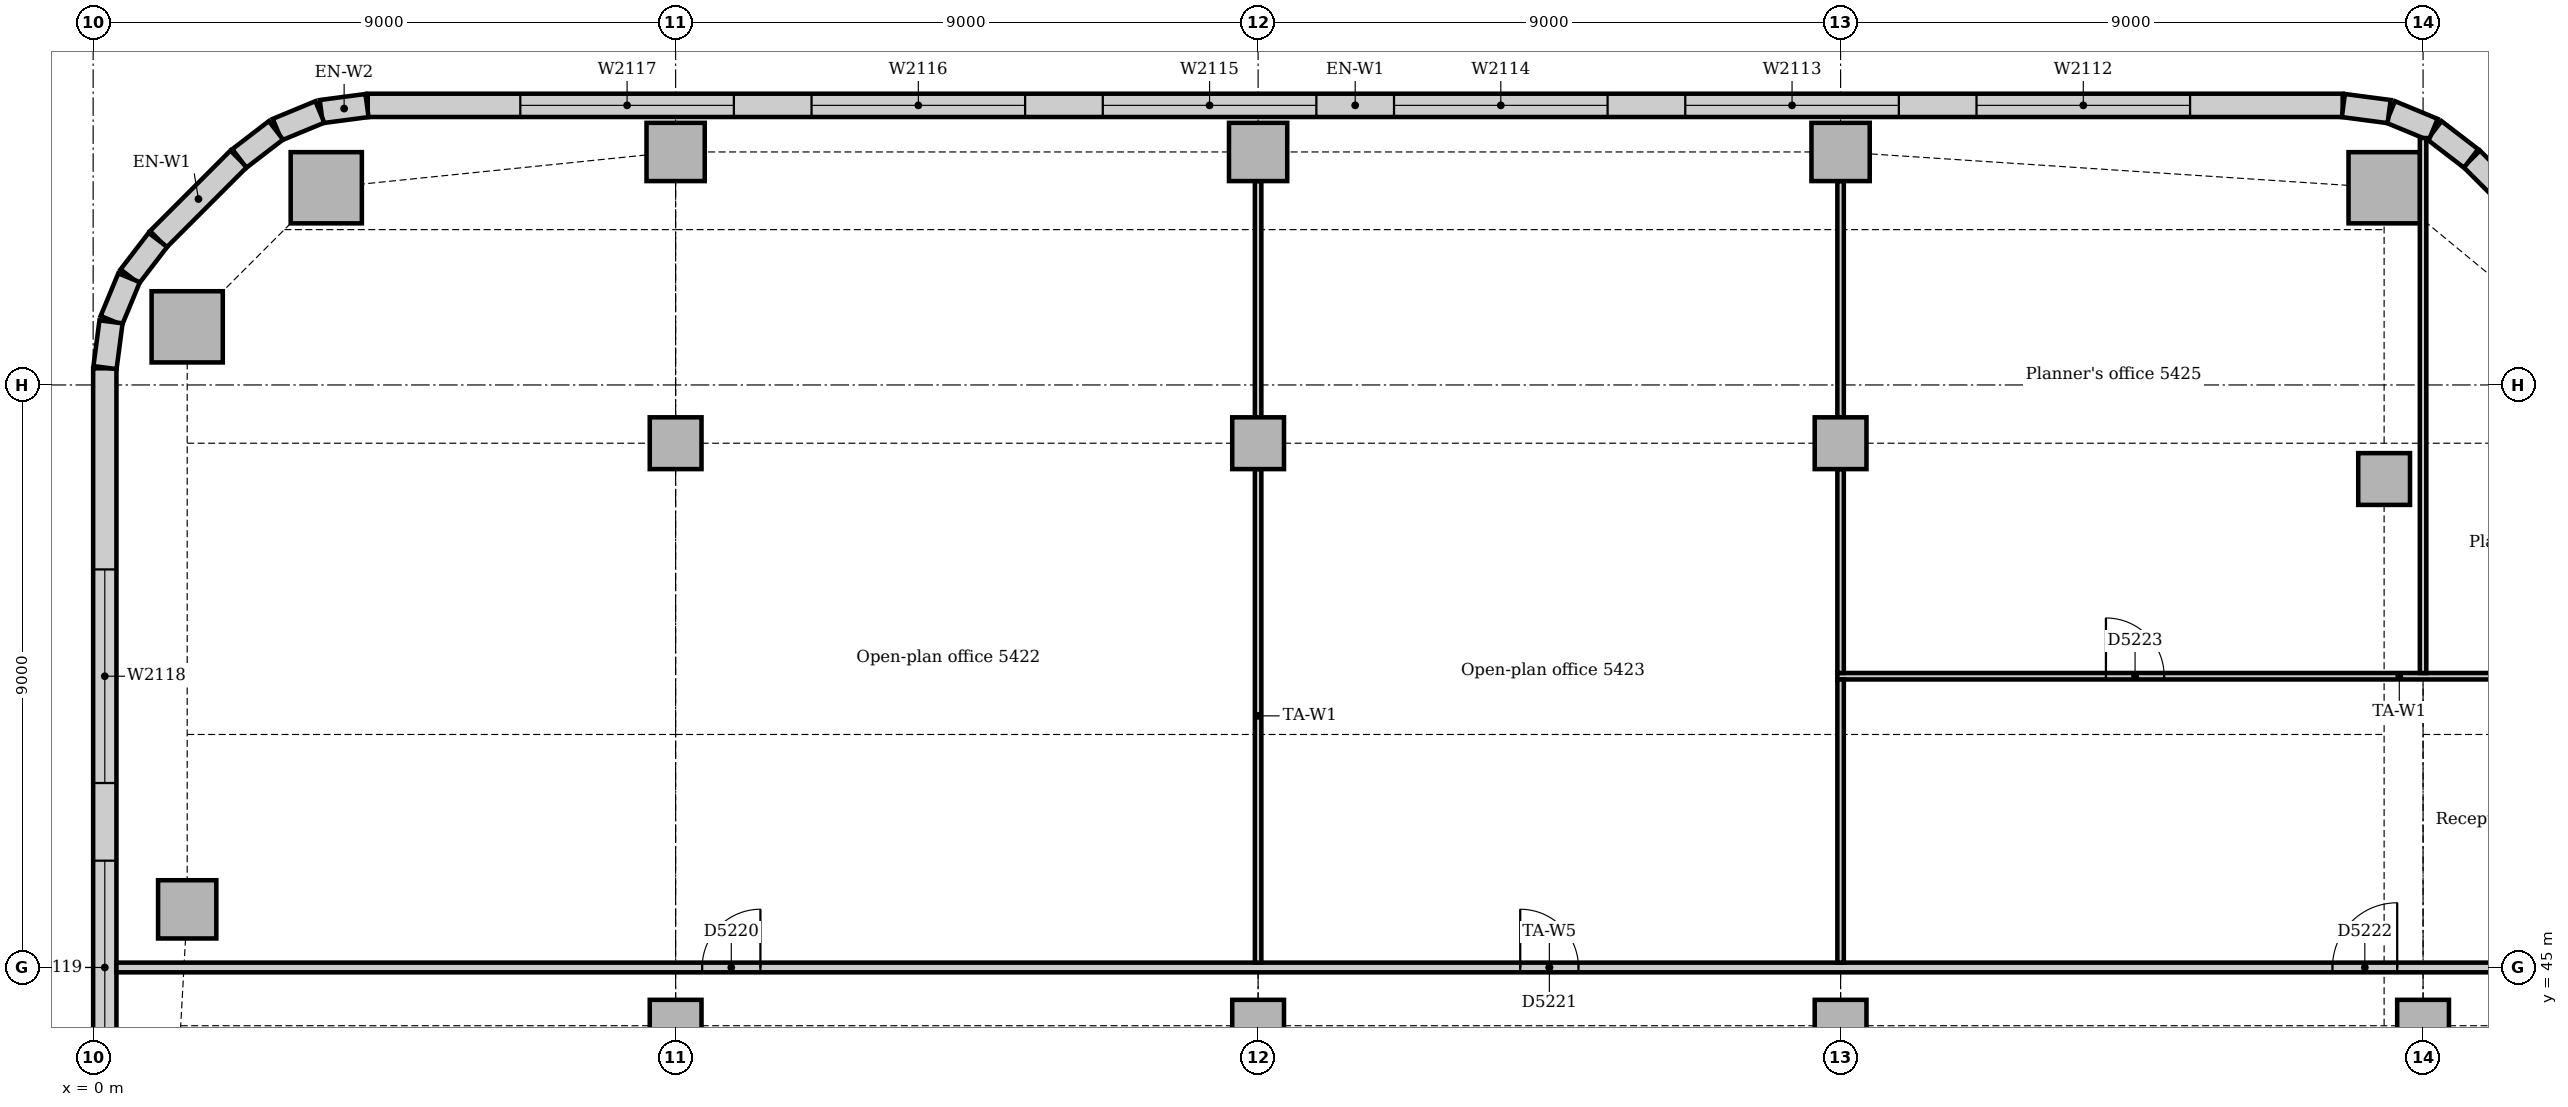
"""IFC4 building model, lengths in metres.
Left out: names, types, materials, properties, quantities, classifications, styles, units other than length and angle.
Written with IfcOpenShell. Run it as: python <this file> out.ifc"""

import sys

from ifc_helpers import new_model, si_unit, direction, frame, frame_2d, origin, origin_2d, place, context, subcontext, project, spatial, rectangle, extrude, element, fill, save


model = new_model("IFC4")
c1 = context("Model", 3, precision=1e-05, world=origin(), true_north=direction((0.0, 1.0)))
c2 = subcontext(c1, "Body", "Model", "MODEL_VIEW")
j1 = project(units=[si_unit("LENGTHUNIT", "METRE"), si_unit("PLANEANGLEUNIT", "RADIAN")], contexts=[c1])
p1 = place(None, origin())
s1 = spatial("IfcSite", under=j1, at=p1, CompositionType="ELEMENT")
p2 = place(p1, origin())
s2 = spatial("IfcBuilding", under=s1, at=p2, CompositionType="ELEMENT")
p3 = place(p2, frame((0.0, 0.0, 226.0)))
s3 = spatial("IfcBuildingStorey", under=s2, at=p3, CompositionType="ELEMENT", Elevation=226.0)
for number, where, z_axis, x_axis in (
    (1, (35.398, 57.047, 0.0), (0.0, 0.0, 1.0), (1.0, 0.0, 0.0)),
    (2, (3.602, 57.047, 0.0), (0.0, 0.0, 1.0), (1.0, 0.0, 0.0)),
    (3, (1.453, 54.898, 0.0), (0.0, 0.0, 1.0), (1.0, 0.0, 0.0)),
):
    element("IfcColumn", number, at=place(p3, frame(where, z_axis=z_axis, x_axis=x_axis)), inside=s3, PredefinedType="COLUMN", context=c2, shape_type="SweptSolid", body=[
        extrude(rectangle(XDim=1.1, YDim=1.1, at=origin_2d()), origin(), (0.0, 0.0, 1.0), 3.85),
    ])
for number, where, z_axis, x_axis in (
    (4, (9.0, 57.6, 0.0), (0.0, 0.0, 1.0), (1.0, 0.0, 0.0)),
    (5, (18.0, 57.6, 0.0), (0.0, 0.0, 1.0), (1.0, 0.0, 0.0)),
    (6, (27.0, 57.6, 0.0), (0.0, 0.0, 1.0), (1.0, 0.0, 0.0)),
    (7, (1.453, 45.898, 0.0), (0.0, 0.0, 1.0), (1.0, 0.0, 0.0)),
):
    element("IfcColumn", number, at=place(p3, frame(where, z_axis=z_axis, x_axis=x_axis)), inside=s3, PredefinedType="COLUMN", context=c2, shape_type="SweptSolid", body=[
        extrude(rectangle(XDim=0.9, YDim=0.9, at=origin_2d()), origin(), (0.0, 0.0, 1.0), 3.85),
    ])
for number, where, z_axis, x_axis in (
    (8, (9.0, 44.1, 0.0), (0.0, 0.0, 1.0), (1.0, 0.0, 0.0)),
    (9, (9.0, 53.1, 0.0), (0.0, 0.0, 1.0), (1.0, 0.0, 0.0)),
    (10, (18.0, 44.1, 0.0), (0.0, 0.0, 1.0), (1.0, 0.0, 0.0)),
    (11, (18.0, 53.1, 0.0), (0.0, 0.0, 1.0), (1.0, 0.0, 0.0)),
    (12, (27.0, 44.1, 0.0), (0.0, 0.0, 1.0), (1.0, 0.0, 0.0)),
    (13, (27.0, 53.1, 0.0), (0.0, 0.0, 1.0), (1.0, 0.0, 0.0)),
    (14, (36.0, 44.1, 0.0), (0.0, 0.0, 1.0), (1.0, 0.0, 0.0)),
    (15, (35.398, 52.547, 0.0), (0.0, 0.0, 1.0), (1.0, 0.0, 0.0)),
):
    element("IfcColumn", number, at=place(p3, frame(where, z_axis=z_axis, x_axis=x_axis)), inside=s3, PredefinedType="COLUMN", context=c2, shape_type="SweptSolid", body=[
        extrude(rectangle(XDim=0.8, YDim=0.8, at=origin_2d()), origin(), (0.0, 0.0, 1.0), 3.85),
    ])
p4 = place(p3, frame((43.994, 50.251, 0.0), z_axis=(0.0, 0.0, 1.0), x_axis=(-0.707106781187, 0.707106781187, 0.0)))
e16 = element("IfcWall", 16, at=p4, inside=s3, PredefinedType="STANDARD", context=c2, shape_type="SweptSolid", body=[
    extrude(rectangle(XDim=10.243, YDim=0.36, at=frame_2d((5.121, 0.0))), origin(), (0.0, 0.0, 1.0), 3.85),
])
p5 = place(p4, frame((3.471, 0.0, 0.9)))
e17 = element("IfcOpeningElement", 17, at=p5, cuts=e16, PredefinedType="OPENING", context=c2, shape_type="SweptSolid", body=[
    extrude(rectangle(XDim=3.3, YDim=1.6, at=frame_2d((1.65, 0.8))), frame((0.0, 0.19, 0.0), z_axis=(0.0, -1.0, 0.0), x_axis=(1.0, 0.0, 0.0)), (0.0, 0.0, 1.0), 0.38),
])
p6 = place(p3, frame((34.757, 58.32, 0.0), z_axis=(0.0, 0.0, 1.0), x_axis=(-1.0, 0.0, 0.0)))
e18 = element("IfcWall", 18, at=p6, inside=s3, PredefinedType="STANDARD", context=c2, shape_type="SweptSolid", body=[
    extrude(rectangle(XDim=30.515, YDim=0.36, at=frame_2d((15.257, 0.0))), origin(), (0.0, 0.0, 1.0), 3.85),
])
p7 = place(p6, frame((2.357, 0.0, 0.9)))
e19 = element("IfcOpeningElement", 19, at=p7, cuts=e18, PredefinedType="OPENING", context=c2, shape_type="SweptSolid", body=[
    extrude(rectangle(XDim=3.3, YDim=1.6, at=frame_2d((1.65, 0.8))), frame((0.0, 0.19, 0.0), z_axis=(0.0, -1.0, 0.0), x_axis=(1.0, 0.0, 0.0)), (0.0, 0.0, 1.0), 0.38),
])
p8 = place(p6, frame((6.857, 0.0, 0.9)))
e20 = element("IfcOpeningElement", 20, at=p8, cuts=e18, PredefinedType="OPENING", context=c2, shape_type="SweptSolid", body=[
    extrude(rectangle(XDim=3.3, YDim=1.6, at=frame_2d((1.65, 0.8))), frame((0.0, 0.19, 0.0), z_axis=(0.0, -1.0, 0.0), x_axis=(1.0, 0.0, 0.0)), (0.0, 0.0, 1.0), 0.38),
])
p9 = place(p6, frame((11.357, 0.0, 0.9)))
e21 = element("IfcOpeningElement", 21, at=p9, cuts=e18, PredefinedType="OPENING", context=c2, shape_type="SweptSolid", body=[
    extrude(rectangle(XDim=3.3, YDim=1.6, at=frame_2d((1.65, 0.8))), frame((0.0, 0.19, 0.0), z_axis=(0.0, -1.0, 0.0), x_axis=(1.0, 0.0, 0.0)), (0.0, 0.0, 1.0), 0.38),
])
p10 = place(p6, frame((15.857, 0.0, 0.9)))
e22 = element("IfcOpeningElement", 22, at=p10, cuts=e18, PredefinedType="OPENING", context=c2, shape_type="SweptSolid", body=[
    extrude(rectangle(XDim=3.3, YDim=1.6, at=frame_2d((1.65, 0.8))), frame((0.0, 0.19, 0.0), z_axis=(0.0, -1.0, 0.0), x_axis=(1.0, 0.0, 0.0)), (0.0, 0.0, 1.0), 0.38),
])
p11 = place(p6, frame((20.357, 0.0, 0.9)))
e23 = element("IfcOpeningElement", 23, at=p11, cuts=e18, PredefinedType="OPENING", context=c2, shape_type="SweptSolid", body=[
    extrude(rectangle(XDim=3.3, YDim=1.6, at=frame_2d((1.65, 0.8))), frame((0.0, 0.19, 0.0), z_axis=(0.0, -1.0, 0.0), x_axis=(1.0, 0.0, 0.0)), (0.0, 0.0, 1.0), 0.38),
])
p12 = place(p6, frame((24.857, 0.0, 0.9)))
e24 = element("IfcOpeningElement", 24, at=p12, cuts=e18, PredefinedType="OPENING", context=c2, shape_type="SweptSolid", body=[
    extrude(rectangle(XDim=3.3, YDim=1.6, at=frame_2d((1.65, 0.8))), frame((0.0, 0.19, 0.0), z_axis=(0.0, -1.0, 0.0), x_axis=(1.0, 0.0, 0.0)), (0.0, 0.0, 1.0), 0.38),
])
p13 = place(p3, frame((2.249, 57.494, 0.0), z_axis=(0.0, 0.0, 1.0), x_axis=(-0.707106781187, -0.707106781187, 0.0)))
e25 = element("IfcWall", 25, at=p13, inside=s3, PredefinedType="STANDARD", context=c2, shape_type="SweptSolid", body=[
    extrude(rectangle(XDim=1.757, YDim=0.36, at=frame_2d((0.879, 0.0))), origin(), (0.0, 0.0, 1.0), 3.85),
])
p14 = place(p3, frame((0.18, 54.257, 0.0), z_axis=(0.0, 0.0, 1.0), x_axis=(0.0, -1.0, 0.0)))
e26 = element("IfcWall", 26, at=p14, inside=s3, PredefinedType="STANDARD", context=c2, shape_type="SweptSolid", body=[
    extrude(rectangle(XDim=12.257, YDim=0.36, at=frame_2d((6.129, 0.0))), origin(), (0.0, 0.0, 1.0), 3.85),
])
p15 = place(p14, frame((3.107, 0.0, 0.9)))
e27 = element("IfcOpeningElement", 27, at=p15, cuts=e26, PredefinedType="OPENING", context=c2, shape_type="SweptSolid", body=[
    extrude(rectangle(XDim=3.3, YDim=1.6, at=frame_2d((1.65, 0.8))), frame((0.0, 0.19, 0.0), z_axis=(0.0, -1.0, 0.0), x_axis=(1.0, 0.0, 0.0)), (0.0, 0.0, 1.0), 0.38),
])
p16 = place(p14, frame((7.607, 0.0, 0.9)))
e28 = element("IfcOpeningElement", 28, at=p16, cuts=e26, PredefinedType="OPENING", context=c2, shape_type="SweptSolid", body=[
    extrude(rectangle(XDim=3.3, YDim=1.6, at=frame_2d((1.65, 0.8))), frame((0.0, 0.19, 0.0), z_axis=(0.0, -1.0, 0.0), x_axis=(1.0, 0.0, 0.0)), (0.0, 0.0, 1.0), 0.38),
])
p17 = place(p3, frame((36.741, 57.5, 0.0), z_axis=(0.0, 0.0, 1.0), x_axis=(-0.793321924995, 0.608802368033, 0.0)))
e29 = element("IfcWall", 29, at=p17, inside=s3, PredefinedType="STANDARD", context=c2, shape_type="SweptSolid", body=[
    extrude(rectangle(XDim=0.713, YDim=0.36, at=frame_2d((0.357, 0.0))), origin(), (0.0, 0.0, 1.0), 3.85),
])
for number, where, z_axis, x_axis in (
    (30, (36.156, 57.945, 0.0), (0.0, 0.0, 1.0), (-0.924, 0.383, 0.0)),
    (31, (35.476, 58.224, 0.0), (0.0, 0.0, 1.0), (-0.991, 0.131, 0.0)),
    (32, (4.231, 58.317, 0.0), (0.0, 0.0, 1.0), (-0.991, -0.131, 0.0)),
    (33, (3.503, 58.218, 0.0), (0.0, 0.0, 1.0), (-0.924, -0.383, 0.0)),
):
    element("IfcWall", number, at=place(p3, frame(where, z_axis=z_axis, x_axis=x_axis)), inside=s3, PredefinedType="STANDARD", context=c2, shape_type="SweptSolid", body=[
        extrude(rectangle(XDim=0.713, YDim=0.36, at=frame_2d((0.356, 0.0))), origin(), (0.0, 0.0, 1.0), 3.85),
    ])
for number, where, z_axis, x_axis in (
    (34, (2.825, 57.934, 0.0), (0.0, 0.0, 1.0), (-0.793, -0.609, 0.0)),
    (35, (1.0, 56.241, 0.0), (0.0, 0.0, 1.0), (-0.609, -0.793, 0.0)),
):
    element("IfcWall", number, at=place(p3, frame(where, z_axis=z_axis, x_axis=x_axis)), inside=s3, PredefinedType="STANDARD", context=c2, shape_type="SweptSolid", body=[
        extrude(rectangle(XDim=0.713, YDim=0.36, at=frame_2d((0.357, 0.0))), origin(), (0.0, 0.0, 1.0), 3.85),
    ])
for number, where, z_axis, x_axis in (
    (36, (0.555, 55.656, 0.0), (0.0, 0.0, 1.0), (-0.383, -0.924, 0.0)),
    (37, (0.276, 54.976, 0.0), (0.0, 0.0, 1.0), (-0.131, -0.991, 0.0)),
):
    element("IfcWall", number, at=place(p3, frame(where, z_axis=z_axis, x_axis=x_axis)), inside=s3, PredefinedType="STANDARD", context=c2, shape_type="SweptSolid", body=[
        extrude(rectangle(XDim=0.713, YDim=0.36, at=frame_2d((0.356, 0.0))), origin(), (0.0, 0.0, 1.0), 3.85),
    ])
p18 = place(p3, frame((0.36, 45.0, 0.0), z_axis=(0.0, 0.0, 1.0), x_axis=(1.0, 0.0, 0.0)))
e38 = element("IfcWall", 38, at=p18, inside=s3, PredefinedType="PARTITIONING", context=c2, shape_type="SweptSolid", body=[
    extrude(rectangle(XDim=44.28, YDim=0.15, at=frame_2d((22.14, 0.0))), origin(), (0.0, 0.0, 1.0), 3.85),
])
p19 = place(p18, frame((9.05, 0.0, 0.0)))
e39 = element("IfcOpeningElement", 39, at=p19, cuts=e38, PredefinedType="OPENING", context=c2, shape_type="SweptSolid", body=[
    extrude(rectangle(XDim=0.9, YDim=2.1, at=frame_2d((0.45, 1.05))), frame((0.0, 0.085, 0.0), z_axis=(0.0, -1.0, 0.0), x_axis=(1.0, 0.0, 0.0)), (0.0, 0.0, 1.0), 0.17),
])
p20 = place(p18, frame((21.69, 0.0, 0.0)))
e40 = element("IfcOpeningElement", 40, at=p20, cuts=e38, PredefinedType="OPENING", context=c2, shape_type="SweptSolid", body=[
    extrude(rectangle(XDim=0.9, YDim=2.1, at=frame_2d((0.45, 1.05))), frame((0.0, 0.085, 0.0), z_axis=(0.0, -1.0, 0.0), x_axis=(1.0, 0.0, 0.0)), (0.0, 0.0, 1.0), 0.17),
])
p21 = place(p18, frame((34.24, 0.0, 0.0)))
e41 = element("IfcOpeningElement", 41, at=p21, cuts=e38, PredefinedType="OPENING", context=c2, shape_type="SweptSolid", body=[
    extrude(rectangle(XDim=1.0, YDim=2.1, at=frame_2d((0.5, 1.05))), frame((0.0, 0.085, 0.0), z_axis=(0.0, -1.0, 0.0), x_axis=(1.0, 0.0, 0.0)), (0.0, 0.0, 1.0), 0.17),
])
p22 = place(p3, frame((26.95, 49.5, 0.0), z_axis=(0.0, 0.0, 1.0), x_axis=(1.0, 0.0, 0.0)))
e42 = element("IfcWall", 42, at=p22, inside=s3, PredefinedType="PARTITIONING", context=c2, shape_type="SweptSolid", body=[
    extrude(rectangle(XDim=17.365, YDim=0.1, at=frame_2d((8.682, 0.0))), origin(), (0.0, 0.0, 1.0), 3.85),
])
p23 = place(p22, frame((4.15, 0.0, 0.0)))
e43 = element("IfcOpeningElement", 43, at=p23, cuts=e42, PredefinedType="OPENING", context=c2, shape_type="SweptSolid", body=[
    extrude(rectangle(XDim=0.9, YDim=2.1, at=frame_2d((0.45, 1.05))), frame((0.0, 0.06, 0.0), z_axis=(0.0, -1.0, 0.0), x_axis=(1.0, 0.0, 0.0)), (0.0, 0.0, 1.0), 0.12),
])
p24 = place(p22, frame((12.7, 0.0, 0.0)))
e44 = element("IfcOpeningElement", 44, at=p24, cuts=e42, PredefinedType="OPENING", context=c2, shape_type="SweptSolid", body=[
    extrude(rectangle(XDim=0.9, YDim=2.1, at=frame_2d((0.45, 1.05))), frame((0.0, 0.06, 0.0), z_axis=(0.0, -1.0, 0.0), x_axis=(1.0, 0.0, 0.0)), (0.0, 0.0, 1.0), 0.12),
])
p25 = place(p3, frame((18.0, 45.075, 0.0), z_axis=(0.0, 0.0, 1.0), x_axis=(0.0, 1.0, 0.0)))
e45 = element("IfcWall", 45, at=p25, inside=s3, PredefinedType="PARTITIONING", context=c2, shape_type="SweptSolid", body=[
    extrude(rectangle(XDim=7.625, YDim=0.1, at=frame_2d((3.812, 0.0))), origin(), (0.0, 0.0, 1.0), 3.35),
])
p26 = place(p3, frame((18.0, 53.5, 0.0), z_axis=(0.0, 0.0, 1.0), x_axis=(0.0, 1.0, 0.0)))
e46 = element("IfcWall", 46, at=p26, inside=s3, PredefinedType="PARTITIONING", context=c2, shape_type="SweptSolid", body=[
    extrude(rectangle(XDim=3.65, YDim=0.1, at=frame_2d((1.825, 0.0))), origin(), (0.0, 0.0, 1.0), 3.41),
])
p27 = place(p3, frame((27.0, 45.075, 0.0), z_axis=(0.0, 0.0, 1.0), x_axis=(0.0, 1.0, 0.0)))
e47 = element("IfcWall", 47, at=p27, inside=s3, PredefinedType="PARTITIONING", context=c2, shape_type="SweptSolid", body=[
    extrude(rectangle(XDim=4.375, YDim=0.1, at=frame_2d((2.188, 0.0))), origin(), (0.0, 0.0, 1.0), 3.35),
])
p28 = place(p3, frame((27.0, 49.55, 0.0), z_axis=(0.0, 0.0, 1.0), x_axis=(0.0, 1.0, 0.0)))
e48 = element("IfcWall", 48, at=p28, inside=s3, PredefinedType="PARTITIONING", context=c2, shape_type="SweptSolid", body=[
    extrude(rectangle(XDim=3.15, YDim=0.1, at=frame_2d((1.575, 0.0))), origin(), (0.0, 0.0, 1.0), 3.35),
])
p29 = place(p3, frame((27.0, 53.5, 0.0), z_axis=(0.0, 0.0, 1.0), x_axis=(0.0, 1.0, 0.0)))
e49 = element("IfcWall", 49, at=p29, inside=s3, PredefinedType="PARTITIONING", context=c2, shape_type="SweptSolid", body=[
    extrude(rectangle(XDim=3.65, YDim=0.1, at=frame_2d((1.825, 0.0))), origin(), (0.0, 0.0, 1.0), 3.41),
])
p30 = place(p3, frame((36.0, 49.55, 0.0), z_axis=(0.0, 0.0, 1.0), x_axis=(0.0, 1.0, 0.0)))
e50 = element("IfcWall", 50, at=p30, inside=s3, PredefinedType="PARTITIONING", context=c2, shape_type="SweptSolid", body=[
    extrude(rectangle(XDim=8.265, YDim=0.1, at=frame_2d((4.133, 0.0))), origin(), (0.0, 0.0, 1.0), 3.35),
])
p31 = place(p7, origin())
e51 = element("IfcWindow", 51, at=p31, inside=s3, PartitioningType="SINGLE_PANEL", PredefinedType="WINDOW", context=c2, shape_type="SweptSolid", body=[
    extrude(rectangle(XDim=3.3, YDim=1.6, at=frame_2d((1.65, 0.8))), frame((0.0, 0.13, 0.0), z_axis=(0.0, -1.0, 0.0), x_axis=(1.0, 0.0, 0.0)), (0.0, 0.0, 1.0), 0.06),
])
fill(e19, e51)
p32 = place(p8, origin())
e52 = element("IfcWindow", 52, at=p32, inside=s3, PartitioningType="SINGLE_PANEL", PredefinedType="WINDOW", context=c2, shape_type="SweptSolid", body=[
    extrude(rectangle(XDim=3.3, YDim=1.6, at=frame_2d((1.65, 0.8))), frame((0.0, 0.13, 0.0), z_axis=(0.0, -1.0, 0.0), x_axis=(1.0, 0.0, 0.0)), (0.0, 0.0, 1.0), 0.06),
])
fill(e20, e52)
p33 = place(p9, origin())
e53 = element("IfcWindow", 53, at=p33, inside=s3, PartitioningType="SINGLE_PANEL", PredefinedType="WINDOW", context=c2, shape_type="SweptSolid", body=[
    extrude(rectangle(XDim=3.3, YDim=1.6, at=frame_2d((1.65, 0.8))), frame((0.0, 0.13, 0.0), z_axis=(0.0, -1.0, 0.0), x_axis=(1.0, 0.0, 0.0)), (0.0, 0.0, 1.0), 0.06),
])
fill(e21, e53)
p34 = place(p10, origin())
e54 = element("IfcWindow", 54, at=p34, inside=s3, PartitioningType="SINGLE_PANEL", PredefinedType="WINDOW", context=c2, shape_type="SweptSolid", body=[
    extrude(rectangle(XDim=3.3, YDim=1.6, at=frame_2d((1.65, 0.8))), frame((0.0, 0.13, 0.0), z_axis=(0.0, -1.0, 0.0), x_axis=(1.0, 0.0, 0.0)), (0.0, 0.0, 1.0), 0.06),
])
fill(e22, e54)
p35 = place(p11, origin())
e55 = element("IfcWindow", 55, at=p35, inside=s3, PartitioningType="SINGLE_PANEL", PredefinedType="WINDOW", context=c2, shape_type="SweptSolid", body=[
    extrude(rectangle(XDim=3.3, YDim=1.6, at=frame_2d((1.65, 0.8))), frame((0.0, 0.13, 0.0), z_axis=(0.0, -1.0, 0.0), x_axis=(1.0, 0.0, 0.0)), (0.0, 0.0, 1.0), 0.06),
])
fill(e23, e55)
p36 = place(p12, origin())
e56 = element("IfcWindow", 56, at=p36, inside=s3, PartitioningType="SINGLE_PANEL", PredefinedType="WINDOW", context=c2, shape_type="SweptSolid", body=[
    extrude(rectangle(XDim=3.3, YDim=1.6, at=frame_2d((1.65, 0.8))), frame((0.0, 0.13, 0.0), z_axis=(0.0, -1.0, 0.0), x_axis=(1.0, 0.0, 0.0)), (0.0, 0.0, 1.0), 0.06),
])
fill(e24, e56)
p37 = place(p15, origin())
e57 = element("IfcWindow", 57, at=p37, inside=s3, PartitioningType="SINGLE_PANEL", PredefinedType="WINDOW", context=c2, shape_type="SweptSolid", body=[
    extrude(rectangle(XDim=3.3, YDim=1.6, at=frame_2d((1.65, 0.8))), frame((0.0, 0.13, 0.0), z_axis=(0.0, -1.0, 0.0), x_axis=(1.0, 0.0, 0.0)), (0.0, 0.0, 1.0), 0.06),
])
fill(e27, e57)
p38 = place(p16, origin())
e58 = element("IfcWindow", 58, at=p38, inside=s3, PartitioningType="SINGLE_PANEL", PredefinedType="WINDOW", context=c2, shape_type="SweptSolid", body=[
    extrude(rectangle(XDim=3.3, YDim=1.6, at=frame_2d((1.65, 0.8))), frame((0.0, 0.13, 0.0), z_axis=(0.0, -1.0, 0.0), x_axis=(1.0, 0.0, 0.0)), (0.0, 0.0, 1.0), 0.06),
])
fill(e28, e58)
p39 = place(p19, origin())
e59 = element("IfcDoor", 59, at=p39, inside=s3, OperationType="SINGLE_SWING_RIGHT", PredefinedType="DOOR", context=c2, shape_type="SweptSolid", body=[
    extrude(rectangle(XDim=0.9, YDim=2.1, at=frame_2d((0.45, 1.05))), frame((0.0, 0.025, 0.0), z_axis=(0.0, -1.0, 0.0), x_axis=(1.0, 0.0, 0.0)), (0.0, 0.0, 1.0), 0.05),
])
fill(e39, e59)
p40 = place(p20, origin())
e60 = element("IfcDoor", 60, at=p40, inside=s3, OperationType="SINGLE_SWING_LEFT", PredefinedType="DOOR", context=c2, shape_type="SweptSolid", body=[
    extrude(rectangle(XDim=0.9, YDim=2.1, at=frame_2d((0.45, 1.05))), frame((0.0, 0.025, 0.0), z_axis=(0.0, -1.0, 0.0), x_axis=(1.0, 0.0, 0.0)), (0.0, 0.0, 1.0), 0.05),
])
fill(e40, e60)
p41 = place(p21, origin())
e61 = element("IfcDoor", 61, at=p41, inside=s3, OperationType="SINGLE_SWING_RIGHT", PredefinedType="DOOR", context=c2, shape_type="SweptSolid", body=[
    extrude(rectangle(XDim=1.0, YDim=2.1, at=frame_2d((0.5, 1.05))), frame((0.0, 0.025, 0.0), z_axis=(0.0, -1.0, 0.0), x_axis=(1.0, 0.0, 0.0)), (0.0, 0.0, 1.0), 0.05),
])
fill(e41, e61)
p42 = place(p23, origin())
e62 = element("IfcDoor", 62, at=p42, inside=s3, OperationType="SINGLE_SWING_LEFT", PredefinedType="DOOR", context=c2, shape_type="SweptSolid", body=[
    extrude(rectangle(XDim=0.9, YDim=2.1, at=frame_2d((0.45, 1.05))), frame((0.0, 0.025, 0.0), z_axis=(0.0, -1.0, 0.0), x_axis=(1.0, 0.0, 0.0)), (0.0, 0.0, 1.0), 0.05),
])
fill(e43, e62)
save(model, sys.argv[1])
